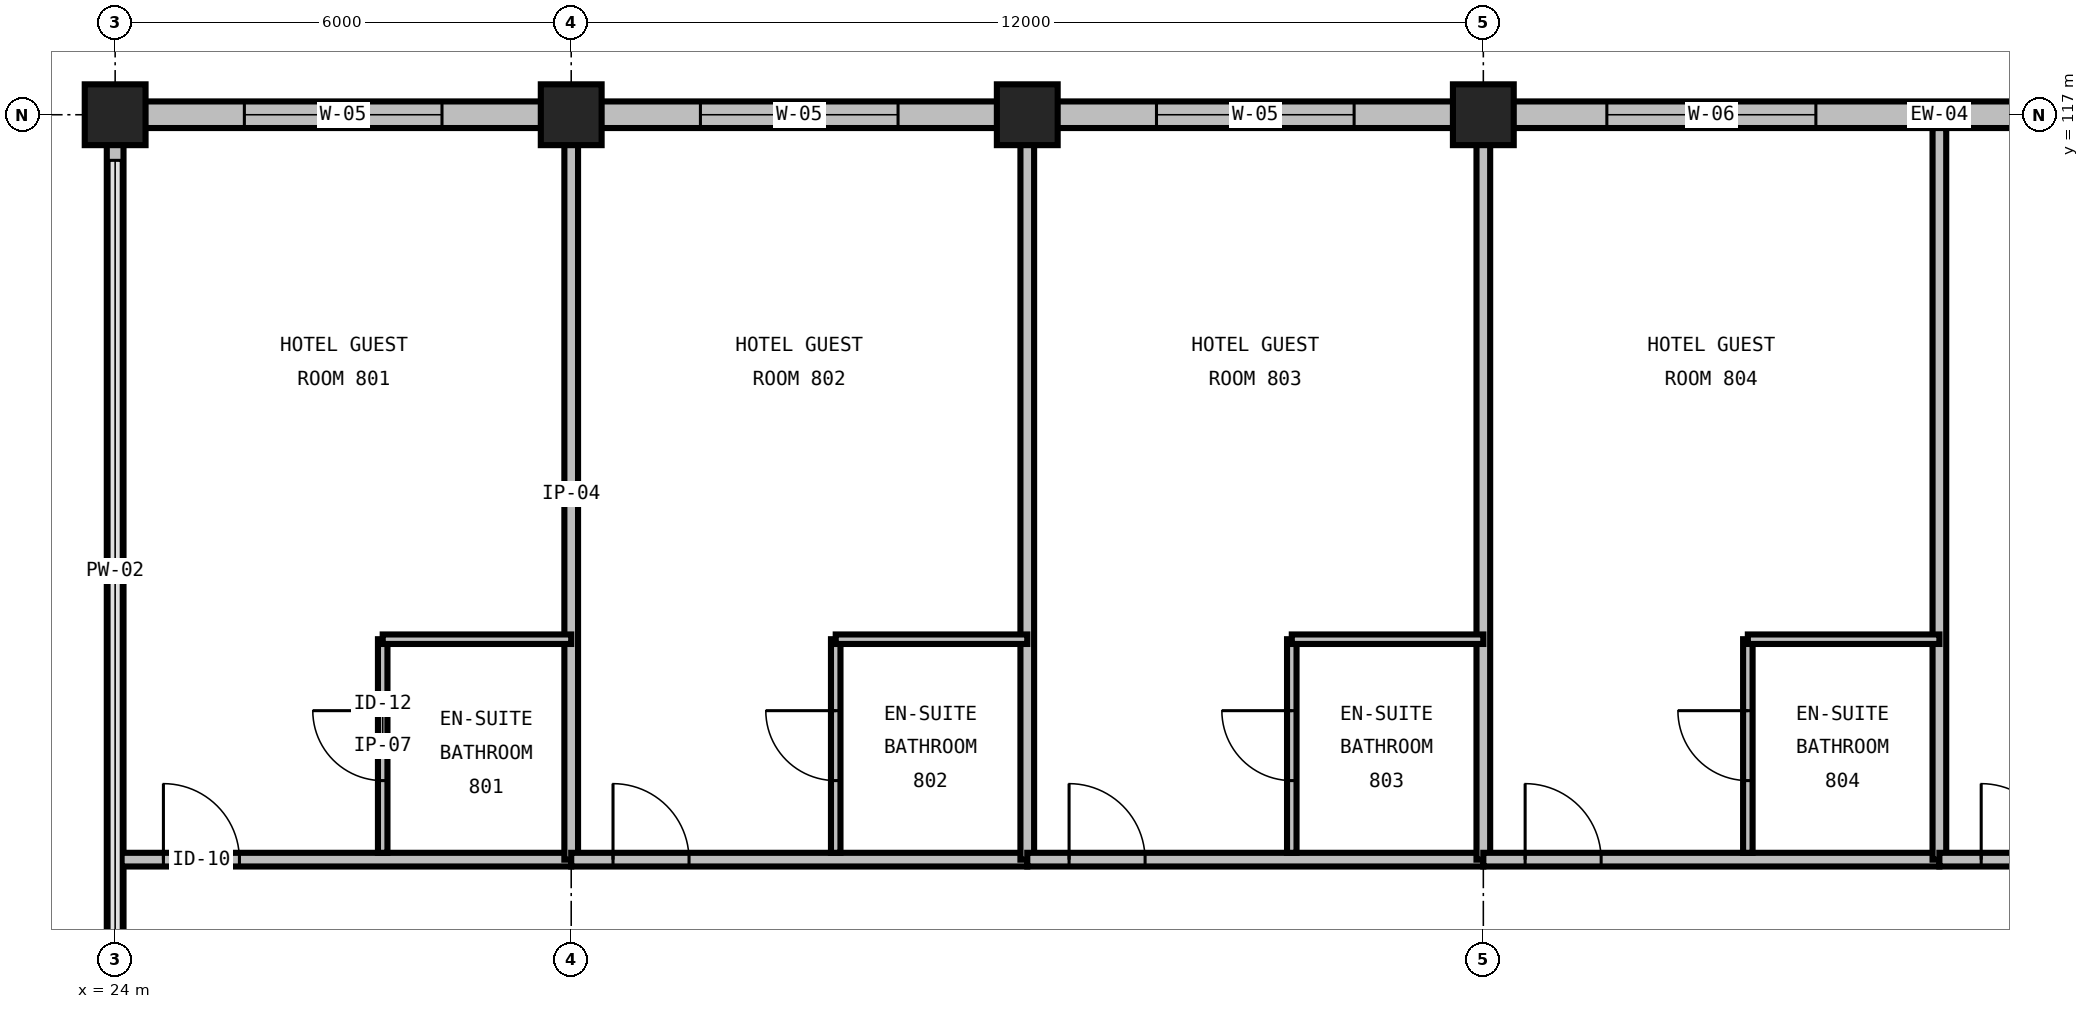
"""IFC4 building model, lengths in metres.
Left out: names, types, materials, properties, quantities, classifications, styles, units other than length and angle.
Written with IfcOpenShell. Run it as: python <this file> out.ifc"""

import sys

from ifc_helpers import new_model, si_unit, direction, frame, frame_2d, origin, origin_2d, place, context, subcontext, project, spatial, rectangle, extrude, element, fill, save


model = new_model("IFC4")
c1 = context("Model", 3, precision=1e-05, world=origin(), true_north=direction((0.0, 1.0)))
c2 = subcontext(c1, "Body", "Model", "MODEL_VIEW")
j1 = project(units=[si_unit("LENGTHUNIT", "METRE"), si_unit("PLANEANGLEUNIT", "RADIAN")], contexts=[c1])
p1 = place(None, origin())
s1 = spatial("IfcSite", under=j1, at=p1, CompositionType="ELEMENT")
p2 = place(p1, origin())
s2 = spatial("IfcBuilding", under=s1, at=p2, CompositionType="ELEMENT")
p3 = place(p2, frame((0.0, 0.0, 38.4)))
s3 = spatial("IfcBuildingStorey", under=s2, at=p3, CompositionType="ELEMENT", Elevation=38.4)
for number, where, z_axis, x_axis in (
    (1, (24.0, 117.0, 0.0), (0.0, 0.0, 1.0), (1.0, 0.0, 0.0)),
    (2, (30.0, 117.0, 0.0), (0.0, 0.0, 1.0), (1.0, 0.0, 0.0)),
    (3, (36.0, 117.0, 0.0), (0.0, 0.0, 1.0), (1.0, 0.0, 0.0)),
    (4, (42.0, 117.0, 0.0), (0.0, 0.0, 1.0), (1.0, 0.0, 0.0)),
):
    element("IfcColumn", number, at=place(p3, frame(where, z_axis=z_axis, x_axis=x_axis)), inside=s3, PredefinedType="COLUMN", context=c2, shape_type="SweptSolid", body=[
        extrude(rectangle(XDim=0.8, YDim=0.8, at=origin_2d()), origin(), (0.0, 0.0, 1.0), 3.6),
    ])
p4 = place(p3, frame((30.0, 117.0, 0.0), z_axis=(0.0, 0.0, 1.0), x_axis=(-1.0, 0.0, 0.0)))
e5 = element("IfcWall", 5, at=p4, inside=s3, PredefinedType="STANDARD", context=c2, shape_type="SweptSolid", body=[
    extrude(rectangle(XDim=6.0, YDim=0.35, at=frame_2d((3.0, 0.0))), origin(), (0.0, 0.0, 1.0), 2.486),
])
p5 = place(p4, frame((1.7, 0.0, 0.72)))
e6 = element("IfcOpeningElement", 6, at=p5, cuts=e5, PredefinedType="OPENING", context=c2, shape_type="SweptSolid", body=[
    extrude(rectangle(XDim=2.6, YDim=1.69, at=frame_2d((1.3, 0.845))), frame((0.0, 0.19, 0.0), z_axis=(0.0, -1.0, 0.0), x_axis=(1.0, 0.0, 0.0)), (0.0, 0.0, 1.0), 0.38),
])
p6 = place(p3, frame((36.0, 117.0, 0.0), z_axis=(0.0, 0.0, 1.0), x_axis=(-1.0, 0.0, 0.0)))
e7 = element("IfcWall", 7, at=p6, inside=s3, PredefinedType="STANDARD", context=c2, shape_type="SweptSolid", body=[
    extrude(rectangle(XDim=6.0, YDim=0.35, at=frame_2d((3.0, 0.0))), origin(), (0.0, 0.0, 1.0), 2.486),
])
p7 = place(p6, frame((1.7, 0.0, 0.72)))
e8 = element("IfcOpeningElement", 8, at=p7, cuts=e7, PredefinedType="OPENING", context=c2, shape_type="SweptSolid", body=[
    extrude(rectangle(XDim=2.6, YDim=1.69, at=frame_2d((1.3, 0.845))), frame((0.0, 0.19, 0.0), z_axis=(0.0, -1.0, 0.0), x_axis=(1.0, 0.0, 0.0)), (0.0, 0.0, 1.0), 0.38),
])
p8 = place(p3, frame((42.0, 117.0, 0.0), z_axis=(0.0, 0.0, 1.0), x_axis=(-1.0, 0.0, 0.0)))
e9 = element("IfcWall", 9, at=p8, inside=s3, PredefinedType="STANDARD", context=c2, shape_type="SweptSolid", body=[
    extrude(rectangle(XDim=6.0, YDim=0.35, at=frame_2d((3.0, 0.0))), origin(), (0.0, 0.0, 1.0), 2.486),
])
p9 = place(p8, frame((1.7, 0.0, 0.72)))
e10 = element("IfcOpeningElement", 10, at=p9, cuts=e9, PredefinedType="OPENING", context=c2, shape_type="SweptSolid", body=[
    extrude(rectangle(XDim=2.6, YDim=1.69, at=frame_2d((1.3, 0.845))), frame((0.0, 0.19, 0.0), z_axis=(0.0, -1.0, 0.0), x_axis=(1.0, 0.0, 0.0)), (0.0, 0.0, 1.0), 0.38),
])
p10 = place(p3, frame((54.0, 117.0, 0.0), z_axis=(0.0, 0.0, 1.0), x_axis=(-1.0, 0.0, 0.0)))
e11 = element("IfcWall", 11, at=p10, inside=s3, PredefinedType="STANDARD", context=c2, shape_type="SweptSolid", body=[
    extrude(rectangle(XDim=12.0, YDim=0.35, at=frame_2d((6.0, 0.0))), origin(), (0.0, 0.0, 1.0), 2.486),
])
p11 = place(p10, frame((1.7, 0.0, 0.72)))
e12 = element("IfcOpeningElement", 12, at=p11, cuts=e11, PredefinedType="OPENING", context=c2, shape_type="SweptSolid", body=[
    extrude(rectangle(XDim=2.6, YDim=1.69, at=frame_2d((1.3, 0.845))), frame((0.0, 0.19, 0.0), z_axis=(0.0, -1.0, 0.0), x_axis=(1.0, 0.0, 0.0)), (0.0, 0.0, 1.0), 0.38),
])
p12 = place(p10, frame((7.625, 0.0, 0.72)))
e13 = element("IfcOpeningElement", 13, at=p12, cuts=e11, PredefinedType="OPENING", context=c2, shape_type="SweptSolid", body=[
    extrude(rectangle(XDim=2.75, YDim=1.69, at=frame_2d((1.375, 0.845))), frame((0.0, 0.19, 0.0), z_axis=(0.0, -1.0, 0.0), x_axis=(1.0, 0.0, 0.0)), (0.0, 0.0, 1.0), 0.38),
])
p13 = place(p3, frame((24.0, 117.0, 0.0), z_axis=(0.0, 0.0, 1.0), x_axis=(0.0, -1.0, 0.0)))
e14 = element("IfcWall", 14, at=p13, inside=s3, PredefinedType="PARAPET", context=c2, shape_type="SweptSolid", body=[
    extrude(rectangle(XDim=12.0, YDim=0.22, at=frame_2d((6.0, 0.0))), origin(), (0.0, 0.0, 1.0), 0.2),
])
p14 = place(p3, frame((24.085, 107.2, 0.0), z_axis=(0.0, 0.0, 1.0), x_axis=(1.0, 0.0, 0.0)))
e15 = element("IfcWall", 15, at=p14, inside=s3, PredefinedType="PARTITIONING", context=c2, shape_type="SweptSolid", body=[
    extrude(rectangle(XDim=5.915, YDim=0.18, at=frame_2d((2.957, 0.0))), origin(), (0.0, 0.0, 1.0), 3.29),
])
p15 = place(p14, frame((0.55, 0.0, 0.0)))
e16 = element("IfcOpeningElement", 16, at=p15, cuts=e15, PredefinedType="OPENING", context=c2, shape_type="SweptSolid", body=[
    extrude(rectangle(XDim=1.0, YDim=2.15, at=frame_2d((0.5, 1.075))), frame((0.0, 0.105, 0.0), z_axis=(0.0, -1.0, 0.0), x_axis=(1.0, 0.0, 0.0)), (0.0, 0.0, 1.0), 0.21),
])
p16 = place(p3, frame((30.0, 107.2, 0.0), z_axis=(0.0, 0.0, 1.0), x_axis=(0.0, 1.0, 0.0)))
e17 = element("IfcWall", 17, at=p16, inside=s3, PredefinedType="PARTITIONING", context=c2, shape_type="SweptSolid", body=[
    extrude(rectangle(XDim=9.625, YDim=0.18, at=frame_2d((4.812, 0.0))), origin(), (0.0, 0.0, 1.0), 2.59),
])
p17 = place(p3, frame((27.52, 107.29, 0.0), z_axis=(0.0, 0.0, 1.0), x_axis=(0.0, 1.0, 0.0)))
e18 = element("IfcWall", 18, at=p17, inside=s3, PredefinedType="PARTITIONING", context=c2, shape_type="SweptSolid", body=[
    extrude(rectangle(XDim=2.81, YDim=0.125, at=frame_2d((1.405, 0.0))), origin(), (0.0, 0.0, 1.0), 3.29),
])
p18 = place(p17, frame((0.95, 0.0, 0.0)))
e19 = element("IfcOpeningElement", 19, at=p18, cuts=e18, PredefinedType="OPENING", context=c2, shape_type="SweptSolid", body=[
    extrude(rectangle(XDim=0.92, YDim=2.1, at=frame_2d((0.46, 1.05))), frame((0.0, 0.077, 0.0), z_axis=(0.0, -1.0, 0.0), x_axis=(1.0, 0.0, 0.0)), (0.0, 0.0, 1.0), 0.155),
])
p19 = place(p3, frame((27.52, 110.1, 0.0), z_axis=(0.0, 0.0, 1.0), x_axis=(1.0, 0.0, 0.0)))
e20 = element("IfcWall", 20, at=p19, inside=s3, PredefinedType="PARTITIONING", context=c2, shape_type="SweptSolid", body=[
    extrude(rectangle(XDim=2.48, YDim=0.125, at=frame_2d((1.24, 0.0))), origin(), (0.0, 0.0, 1.0), 3.29),
])
p20 = place(p3, frame((30.0, 107.2, 0.0), z_axis=(0.0, 0.0, 1.0), x_axis=(1.0, 0.0, 0.0)))
e21 = element("IfcWall", 21, at=p20, inside=s3, PredefinedType="PARTITIONING", context=c2, shape_type="SweptSolid", body=[
    extrude(rectangle(XDim=6.0, YDim=0.18, at=frame_2d((3.0, 0.0))), origin(), (0.0, 0.0, 1.0), 3.29),
])
p21 = place(p20, frame((0.55, 0.0, 0.0)))
e22 = element("IfcOpeningElement", 22, at=p21, cuts=e21, PredefinedType="OPENING", context=c2, shape_type="SweptSolid", body=[
    extrude(rectangle(XDim=1.0, YDim=2.15, at=frame_2d((0.5, 1.075))), frame((0.0, 0.105, 0.0), z_axis=(0.0, -1.0, 0.0), x_axis=(1.0, 0.0, 0.0)), (0.0, 0.0, 1.0), 0.21),
])
p22 = place(p3, frame((36.0, 107.2, 0.0), z_axis=(0.0, 0.0, 1.0), x_axis=(0.0, 1.0, 0.0)))
e23 = element("IfcWall", 23, at=p22, inside=s3, PredefinedType="PARTITIONING", context=c2, shape_type="SweptSolid", body=[
    extrude(rectangle(XDim=9.625, YDim=0.18, at=frame_2d((4.812, 0.0))), origin(), (0.0, 0.0, 1.0), 2.59),
])
p23 = place(p3, frame((33.48, 107.29, 0.0), z_axis=(0.0, 0.0, 1.0), x_axis=(0.0, 1.0, 0.0)))
e24 = element("IfcWall", 24, at=p23, inside=s3, PredefinedType="PARTITIONING", context=c2, shape_type="SweptSolid", body=[
    extrude(rectangle(XDim=2.81, YDim=0.125, at=frame_2d((1.405, 0.0))), origin(), (0.0, 0.0, 1.0), 3.29),
])
p24 = place(p23, frame((0.95, 0.0, 0.0)))
e25 = element("IfcOpeningElement", 25, at=p24, cuts=e24, PredefinedType="OPENING", context=c2, shape_type="SweptSolid", body=[
    extrude(rectangle(XDim=0.92, YDim=2.1, at=frame_2d((0.46, 1.05))), frame((0.0, 0.077, 0.0), z_axis=(0.0, -1.0, 0.0), x_axis=(1.0, 0.0, 0.0)), (0.0, 0.0, 1.0), 0.155),
])
p25 = place(p3, frame((33.48, 110.1, 0.0), z_axis=(0.0, 0.0, 1.0), x_axis=(1.0, 0.0, 0.0)))
e26 = element("IfcWall", 26, at=p25, inside=s3, PredefinedType="PARTITIONING", context=c2, shape_type="SweptSolid", body=[
    extrude(rectangle(XDim=2.52, YDim=0.125, at=frame_2d((1.26, 0.0))), origin(), (0.0, 0.0, 1.0), 3.29),
])
p26 = place(p3, frame((36.0, 107.2, 0.0), z_axis=(0.0, 0.0, 1.0), x_axis=(1.0, 0.0, 0.0)))
e27 = element("IfcWall", 27, at=p26, inside=s3, PredefinedType="PARTITIONING", context=c2, shape_type="SweptSolid", body=[
    extrude(rectangle(XDim=6.0, YDim=0.18, at=frame_2d((3.0, 0.0))), origin(), (0.0, 0.0, 1.0), 3.29),
])
p27 = place(p26, frame((0.55, 0.0, 0.0)))
e28 = element("IfcOpeningElement", 28, at=p27, cuts=e27, PredefinedType="OPENING", context=c2, shape_type="SweptSolid", body=[
    extrude(rectangle(XDim=1.0, YDim=2.15, at=frame_2d((0.5, 1.075))), frame((0.0, 0.105, 0.0), z_axis=(0.0, -1.0, 0.0), x_axis=(1.0, 0.0, 0.0)), (0.0, 0.0, 1.0), 0.21),
])
p28 = place(p3, frame((42.0, 107.2, 0.0), z_axis=(0.0, 0.0, 1.0), x_axis=(0.0, 1.0, 0.0)))
e29 = element("IfcWall", 29, at=p28, inside=s3, PredefinedType="PARTITIONING", context=c2, shape_type="SweptSolid", body=[
    extrude(rectangle(XDim=9.625, YDim=0.18, at=frame_2d((4.812, 0.0))), origin(), (0.0, 0.0, 1.0), 2.59),
])
p29 = place(p3, frame((39.48, 107.29, 0.0), z_axis=(0.0, 0.0, 1.0), x_axis=(0.0, 1.0, 0.0)))
e30 = element("IfcWall", 30, at=p29, inside=s3, PredefinedType="PARTITIONING", context=c2, shape_type="SweptSolid", body=[
    extrude(rectangle(XDim=2.81, YDim=0.125, at=frame_2d((1.405, 0.0))), origin(), (0.0, 0.0, 1.0), 3.29),
])
p30 = place(p29, frame((0.95, 0.0, 0.0)))
e31 = element("IfcOpeningElement", 31, at=p30, cuts=e30, PredefinedType="OPENING", context=c2, shape_type="SweptSolid", body=[
    extrude(rectangle(XDim=0.92, YDim=2.1, at=frame_2d((0.46, 1.05))), frame((0.0, 0.077, 0.0), z_axis=(0.0, -1.0, 0.0), x_axis=(1.0, 0.0, 0.0)), (0.0, 0.0, 1.0), 0.155),
])
p31 = place(p3, frame((39.48, 110.1, 0.0), z_axis=(0.0, 0.0, 1.0), x_axis=(1.0, 0.0, 0.0)))
e32 = element("IfcWall", 32, at=p31, inside=s3, PredefinedType="PARTITIONING", context=c2, shape_type="SweptSolid", body=[
    extrude(rectangle(XDim=2.52, YDim=0.125, at=frame_2d((1.26, 0.0))), origin(), (0.0, 0.0, 1.0), 3.29),
])
p32 = place(p3, frame((42.0, 107.2, 0.0), z_axis=(0.0, 0.0, 1.0), x_axis=(1.0, 0.0, 0.0)))
e33 = element("IfcWall", 33, at=p32, inside=s3, PredefinedType="PARTITIONING", context=c2, shape_type="SweptSolid", body=[
    extrude(rectangle(XDim=6.0, YDim=0.18, at=frame_2d((3.0, 0.0))), origin(), (0.0, 0.0, 1.0), 3.29),
])
p33 = place(p32, frame((0.55, 0.0, 0.0)))
e34 = element("IfcOpeningElement", 34, at=p33, cuts=e33, PredefinedType="OPENING", context=c2, shape_type="SweptSolid", body=[
    extrude(rectangle(XDim=1.0, YDim=2.15, at=frame_2d((0.5, 1.075))), frame((0.0, 0.105, 0.0), z_axis=(0.0, -1.0, 0.0), x_axis=(1.0, 0.0, 0.0)), (0.0, 0.0, 1.0), 0.21),
])
p34 = place(p3, frame((48.0, 107.2, 0.0), z_axis=(0.0, 0.0, 1.0), x_axis=(0.0, 1.0, 0.0)))
e35 = element("IfcWall", 35, at=p34, inside=s3, PredefinedType="PARTITIONING", context=c2, shape_type="SweptSolid", body=[
    extrude(rectangle(XDim=9.625, YDim=0.18, at=frame_2d((4.812, 0.0))), origin(), (0.0, 0.0, 1.0), 3.29),
])
p35 = place(p3, frame((45.48, 107.29, 0.0), z_axis=(0.0, 0.0, 1.0), x_axis=(0.0, 1.0, 0.0)))
e36 = element("IfcWall", 36, at=p35, inside=s3, PredefinedType="PARTITIONING", context=c2, shape_type="SweptSolid", body=[
    extrude(rectangle(XDim=2.81, YDim=0.125, at=frame_2d((1.405, 0.0))), origin(), (0.0, 0.0, 1.0), 3.29),
])
p36 = place(p35, frame((0.95, 0.0, 0.0)))
e37 = element("IfcOpeningElement", 37, at=p36, cuts=e36, PredefinedType="OPENING", context=c2, shape_type="SweptSolid", body=[
    extrude(rectangle(XDim=0.92, YDim=2.1, at=frame_2d((0.46, 1.05))), frame((0.0, 0.077, 0.0), z_axis=(0.0, -1.0, 0.0), x_axis=(1.0, 0.0, 0.0)), (0.0, 0.0, 1.0), 0.155),
])
p37 = place(p3, frame((45.48, 110.1, 0.0), z_axis=(0.0, 0.0, 1.0), x_axis=(1.0, 0.0, 0.0)))
e38 = element("IfcWall", 38, at=p37, inside=s3, PredefinedType="PARTITIONING", context=c2, shape_type="SweptSolid", body=[
    extrude(rectangle(XDim=2.52, YDim=0.125, at=frame_2d((1.26, 0.0))), origin(), (0.0, 0.0, 1.0), 3.29),
])
p38 = place(p3, frame((48.0, 107.2, 0.0), z_axis=(0.0, 0.0, 1.0), x_axis=(1.0, 0.0, 0.0)))
e39 = element("IfcWall", 39, at=p38, inside=s3, PredefinedType="PARTITIONING", context=c2, shape_type="SweptSolid", body=[
    extrude(rectangle(XDim=6.0, YDim=0.18, at=frame_2d((3.0, 0.0))), origin(), (0.0, 0.0, 1.0), 3.29),
])
p39 = place(p38, frame((0.55, 0.0, 0.0)))
e40 = element("IfcOpeningElement", 40, at=p39, cuts=e39, PredefinedType="OPENING", context=c2, shape_type="SweptSolid", body=[
    extrude(rectangle(XDim=1.0, YDim=2.15, at=frame_2d((0.5, 1.075))), frame((0.0, 0.105, 0.0), z_axis=(0.0, -1.0, 0.0), x_axis=(1.0, 0.0, 0.0)), (0.0, 0.0, 1.0), 0.21),
])
p40 = place(p5, origin())
e41 = element("IfcWindow", 41, at=p40, inside=s3, PartitioningType="DOUBLE_PANEL_VERTICAL", PredefinedType="WINDOW", context=c2, shape_type="SweptSolid", body=[
    extrude(rectangle(XDim=2.6, YDim=1.69, at=frame_2d((1.3, 0.845))), frame((0.0, 0.03, 0.0), z_axis=(0.0, -1.0, 0.0), x_axis=(1.0, 0.0, 0.0)), (0.0, 0.0, 1.0), 0.06),
])
fill(e6, e41)
p41 = place(p7, origin())
e42 = element("IfcWindow", 42, at=p41, inside=s3, PartitioningType="DOUBLE_PANEL_VERTICAL", PredefinedType="WINDOW", context=c2, shape_type="SweptSolid", body=[
    extrude(rectangle(XDim=2.6, YDim=1.69, at=frame_2d((1.3, 0.845))), frame((0.0, 0.03, 0.0), z_axis=(0.0, -1.0, 0.0), x_axis=(1.0, 0.0, 0.0)), (0.0, 0.0, 1.0), 0.06),
])
fill(e8, e42)
p42 = place(p9, origin())
e43 = element("IfcWindow", 43, at=p42, inside=s3, PartitioningType="DOUBLE_PANEL_VERTICAL", PredefinedType="WINDOW", context=c2, shape_type="SweptSolid", body=[
    extrude(rectangle(XDim=2.6, YDim=1.69, at=frame_2d((1.3, 0.845))), frame((0.0, 0.03, 0.0), z_axis=(0.0, -1.0, 0.0), x_axis=(1.0, 0.0, 0.0)), (0.0, 0.0, 1.0), 0.06),
])
fill(e10, e43)
p43 = place(p12, origin())
e44 = element("IfcWindow", 44, at=p43, inside=s3, PartitioningType="TRIPLE_PANEL_VERTICAL", PredefinedType="WINDOW", context=c2, shape_type="SweptSolid", body=[
    extrude(rectangle(XDim=2.75, YDim=1.69, at=frame_2d((1.375, 0.845))), frame((0.0, 0.03, 0.0), z_axis=(0.0, -1.0, 0.0), x_axis=(1.0, 0.0, 0.0)), (0.0, 0.0, 1.0), 0.06),
])
fill(e13, e44)
p44 = place(p15, origin())
e45 = element("IfcDoor", 45, at=p44, inside=s3, OperationType="SINGLE_SWING_LEFT", PredefinedType="DOOR", context=c2, shape_type="SweptSolid", body=[
    extrude(rectangle(XDim=1.0, YDim=2.15, at=frame_2d((0.5, 1.075))), frame((0.0, 0.025, 0.0), z_axis=(0.0, -1.0, 0.0), x_axis=(1.0, 0.0, 0.0)), (0.0, 0.0, 1.0), 0.05),
])
fill(e16, e45)
p45 = place(p18, origin())
e46 = element("IfcDoor", 46, at=p45, inside=s3, OperationType="SINGLE_SWING_RIGHT", PredefinedType="DOOR", context=c2, shape_type="SweptSolid", body=[
    extrude(rectangle(XDim=0.92, YDim=2.1, at=frame_2d((0.46, 1.05))), frame((0.0, 0.025, 0.0), z_axis=(0.0, -1.0, 0.0), x_axis=(1.0, 0.0, 0.0)), (0.0, 0.0, 1.0), 0.05),
])
fill(e19, e46)
p46 = place(p21, origin())
e47 = element("IfcDoor", 47, at=p46, inside=s3, OperationType="SINGLE_SWING_LEFT", PredefinedType="DOOR", context=c2, shape_type="SweptSolid", body=[
    extrude(rectangle(XDim=1.0, YDim=2.15, at=frame_2d((0.5, 1.075))), frame((0.0, 0.025, 0.0), z_axis=(0.0, -1.0, 0.0), x_axis=(1.0, 0.0, 0.0)), (0.0, 0.0, 1.0), 0.05),
])
fill(e22, e47)
p47 = place(p24, origin())
e48 = element("IfcDoor", 48, at=p47, inside=s3, OperationType="SINGLE_SWING_RIGHT", PredefinedType="DOOR", context=c2, shape_type="SweptSolid", body=[
    extrude(rectangle(XDim=0.92, YDim=2.1, at=frame_2d((0.46, 1.05))), frame((0.0, 0.025, 0.0), z_axis=(0.0, -1.0, 0.0), x_axis=(1.0, 0.0, 0.0)), (0.0, 0.0, 1.0), 0.05),
])
fill(e25, e48)
p48 = place(p27, origin())
e49 = element("IfcDoor", 49, at=p48, inside=s3, OperationType="SINGLE_SWING_LEFT", PredefinedType="DOOR", context=c2, shape_type="SweptSolid", body=[
    extrude(rectangle(XDim=1.0, YDim=2.15, at=frame_2d((0.5, 1.075))), frame((0.0, 0.025, 0.0), z_axis=(0.0, -1.0, 0.0), x_axis=(1.0, 0.0, 0.0)), (0.0, 0.0, 1.0), 0.05),
])
fill(e28, e49)
p49 = place(p30, origin())
e50 = element("IfcDoor", 50, at=p49, inside=s3, OperationType="SINGLE_SWING_RIGHT", PredefinedType="DOOR", context=c2, shape_type="SweptSolid", body=[
    extrude(rectangle(XDim=0.92, YDim=2.1, at=frame_2d((0.46, 1.05))), frame((0.0, 0.025, 0.0), z_axis=(0.0, -1.0, 0.0), x_axis=(1.0, 0.0, 0.0)), (0.0, 0.0, 1.0), 0.05),
])
fill(e31, e50)
p50 = place(p33, origin())
e51 = element("IfcDoor", 51, at=p50, inside=s3, OperationType="SINGLE_SWING_LEFT", PredefinedType="DOOR", context=c2, shape_type="SweptSolid", body=[
    extrude(rectangle(XDim=1.0, YDim=2.15, at=frame_2d((0.5, 1.075))), frame((0.0, 0.025, 0.0), z_axis=(0.0, -1.0, 0.0), x_axis=(1.0, 0.0, 0.0)), (0.0, 0.0, 1.0), 0.05),
])
fill(e34, e51)
p51 = place(p36, origin())
e52 = element("IfcDoor", 52, at=p51, inside=s3, OperationType="SINGLE_SWING_RIGHT", PredefinedType="DOOR", context=c2, shape_type="SweptSolid", body=[
    extrude(rectangle(XDim=0.92, YDim=2.1, at=frame_2d((0.46, 1.05))), frame((0.0, 0.025, 0.0), z_axis=(0.0, -1.0, 0.0), x_axis=(1.0, 0.0, 0.0)), (0.0, 0.0, 1.0), 0.05),
])
fill(e37, e52)
p52 = place(p39, origin())
e53 = element("IfcDoor", 53, at=p52, inside=s3, OperationType="SINGLE_SWING_LEFT", PredefinedType="DOOR", context=c2, shape_type="SweptSolid", body=[
    extrude(rectangle(XDim=1.0, YDim=2.15, at=frame_2d((0.5, 1.075))), frame((0.0, 0.025, 0.0), z_axis=(0.0, -1.0, 0.0), x_axis=(1.0, 0.0, 0.0)), (0.0, 0.0, 1.0), 0.05),
])
fill(e40, e53)
save(model, sys.argv[1])
